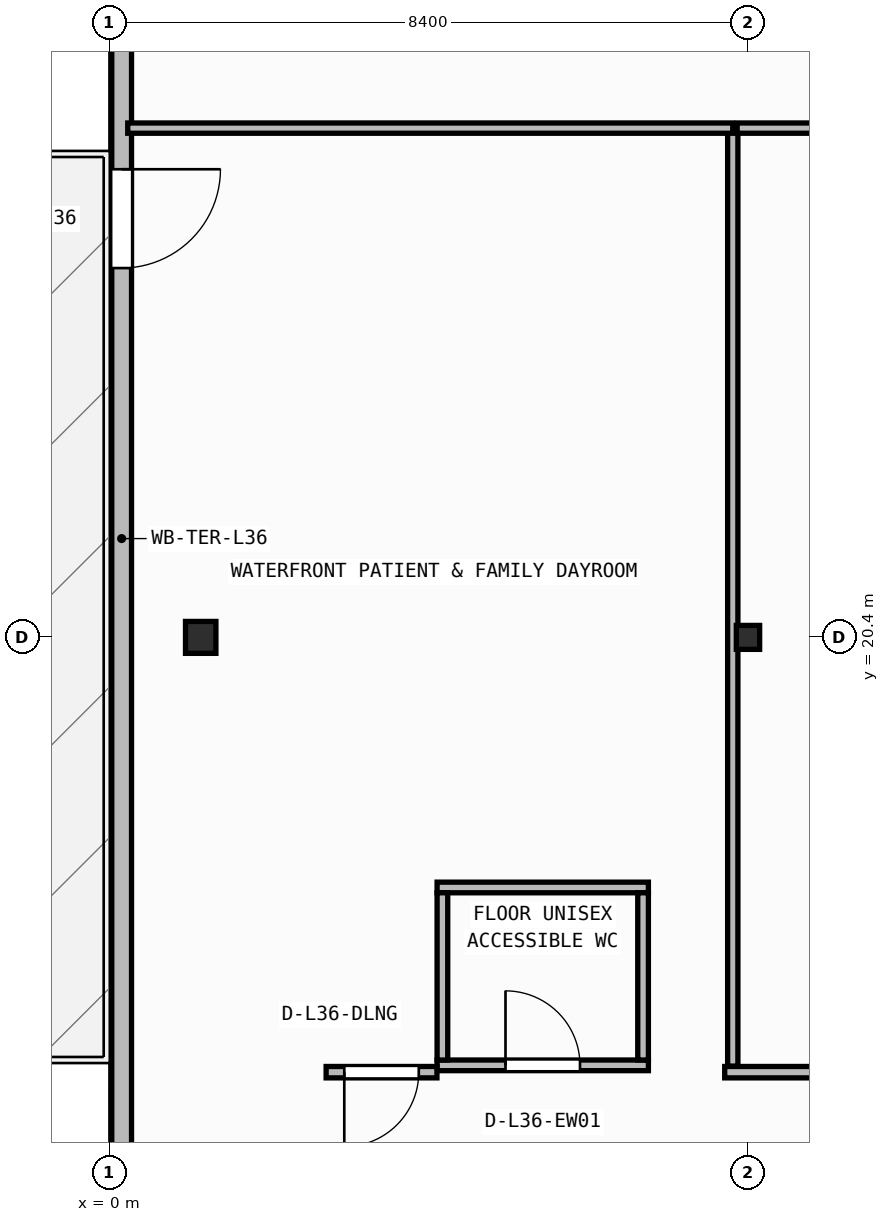
"""IFC4 building model, lengths in metres.
Left out: names, types, materials, properties, quantities, classifications, styles, units other than length and angle.
Written with IfcOpenShell. Run it as: python <this file> out.ifc"""

import sys

from ifc_helpers import new_model, si_unit, direction, frame, frame_2d, origin, origin_2d, place, context, subcontext, project, spatial, rectangle, i_section, extrude, element, fill, save


model = new_model("IFC4")
c1 = context("Model", 3, precision=1e-05, world=origin(), true_north=direction((0.0, 1.0)))
c2 = subcontext(c1, "Body", "Model", "MODEL_VIEW")
j1 = project(units=[si_unit("LENGTHUNIT", "METRE"), si_unit("PLANEANGLEUNIT", "RADIAN")], contexts=[c1])
p1 = place(None, origin())
s1 = spatial("IfcSite", under=j1, at=p1, CompositionType="ELEMENT")
p2 = place(p1, origin())
s2 = spatial("IfcBuilding", under=s1, at=p2, CompositionType="ELEMENT")
p3 = place(p2, frame((0.0, 0.0, 146.8)))
s3 = spatial("IfcBuildingStorey", under=s2, at=p3, CompositionType="ELEMENT", Elevation=146.8)
p4 = place(p3, frame((1.2, 20.4, 0.0), z_axis=(0.0, 0.0, 1.0), x_axis=(1.0, 0.0, 0.0)))
e1 = element("IfcColumn", 1, at=p4, inside=s3, PredefinedType="COLUMN", context=c2, shape_type="SweptSolid", body=[
    extrude(i_section(OverallWidth=0.4, OverallDepth=0.42, WebThickness=0.025, FlangeThickness=0.04, at=origin_2d()), origin(), (0.0, 0.0, 1.0), 3.95),
])
p5 = place(p3, frame((8.4, 20.4, 0.0), z_axis=(0.0, 0.0, 1.0), x_axis=(1.0, 0.0, 0.0)))
e2 = element("IfcColumn", 2, at=p5, inside=s3, PredefinedType="COLUMN", context=c2, shape_type="SweptSolid", body=[
    extrude(i_section(OverallWidth=0.307, OverallDepth=0.315, WebThickness=0.012, FlangeThickness=0.019, FilletRadius=0.017, at=origin_2d()), origin(), (0.0, 0.0, 1.0), 3.95),
])
p6 = place(p3, frame((0.16, 40.64, 0.0), z_axis=(0.0, 0.0, 1.0), x_axis=(0.0, -1.0, 0.0)))
e3 = element("IfcWall", 3, at=p6, inside=s3, PredefinedType="STANDARD", context=c2, shape_type="SweptSolid", body=[
    extrude(rectangle(XDim=37.88, YDim=0.26, at=frame_2d((18.94, 0.0))), origin(), (0.0, 0.0, 1.0), 3.71),
])
p7 = place(p6, frame((14.081, 0.0, 0.0)))
e4 = element("IfcOpeningElement", 4, at=p7, cuts=e3, PredefinedType="OPENING", context=c2, shape_type="SweptSolid", body=[
    extrude(rectangle(XDim=1.3, YDim=2.15, at=frame_2d((0.65, 1.075))), frame((0.0, 0.14, 0.0), z_axis=(0.0, -1.0, 0.0), x_axis=(1.0, 0.0, 0.0)), (0.0, 0.0, 1.0), 0.28),
])
p8 = place(p3, frame((4.31, 14.77, 0.0), z_axis=(0.0, 0.0, 1.0), x_axis=(1.0, 0.0, 0.0)))
e5 = element("IfcWall", 5, at=p8, inside=s3, PredefinedType="PARTITIONING", context=c2, shape_type="SweptSolid", body=[
    extrude(rectangle(XDim=2.78, YDim=0.14, at=frame_2d((1.39, 0.0))), origin(), (0.0, 0.0, 1.0), 3.71),
])
p9 = place(p8, frame((0.9, 0.0, 0.0)))
e6 = element("IfcOpeningElement", 6, at=p9, cuts=e5, PredefinedType="OPENING", context=c2, shape_type="SweptSolid", body=[
    extrude(rectangle(XDim=0.98, YDim=2.1, at=frame_2d((0.49, 1.05))), frame((0.0, 0.08, 0.0), z_axis=(0.0, -1.0, 0.0), x_axis=(1.0, 0.0, 0.0)), (0.0, 0.0, 1.0), 0.16),
])
p10 = place(p3, frame((4.31, 17.11, 0.0), z_axis=(0.0, 0.0, 1.0), x_axis=(1.0, 0.0, 0.0)))
e7 = element("IfcWall", 7, at=p10, inside=s3, PredefinedType="PARTITIONING", context=c2, shape_type="SweptSolid", body=[
    extrude(rectangle(XDim=2.78, YDim=0.14, at=frame_2d((1.39, 0.0))), origin(), (0.0, 0.0, 1.0), 3.71),
])
for number, where, z_axis, x_axis in (
    (8, (4.38, 14.84, 0.0), (0.0, 0.0, 1.0), (0.0, 1.0, 0.0)),
    (9, (7.02, 14.84, 0.0), (0.0, 0.0, 1.0), (0.0, 1.0, 0.0)),
):
    element("IfcWall", number, at=place(p3, frame(where, z_axis=z_axis, x_axis=x_axis)), inside=s3, PredefinedType="PARTITIONING", context=c2, shape_type="SweptSolid", body=[
        extrude(rectangle(XDim=2.2, YDim=0.14, at=frame_2d((1.1, 0.0))), origin(), (0.0, 0.0, 1.0), 3.71),
    ])
p11 = place(p3, frame((4.308, 14.68, 0.0), z_axis=(0.0, 0.0, 1.0), x_axis=(-1.0, 0.0, 0.0)))
e10 = element("IfcWall", 10, at=p11, inside=s3, PredefinedType="PARTITIONING", context=c2, shape_type="SweptSolid", body=[
    extrude(rectangle(XDim=1.458, YDim=0.15, at=frame_2d((0.729, 0.0))), origin(), (0.0, 0.0, 1.0), 3.71),
])
p12 = place(p11, frame((0.239, 0.0, 0.0)))
e11 = element("IfcOpeningElement", 11, at=p12, cuts=e10, PredefinedType="OPENING", context=c2, shape_type="SweptSolid", body=[
    extrude(rectangle(XDim=0.98, YDim=2.1, at=frame_2d((0.49, 1.05))), frame((0.0, 0.085, 0.0), z_axis=(0.0, -1.0, 0.0), x_axis=(1.0, 0.0, 0.0)), (0.0, 0.0, 1.0), 0.17),
])
p13 = place(p3, frame((19.346, 14.68, 0.0), z_axis=(0.0, 0.0, 1.0), x_axis=(-1.0, 0.0, 0.0)))
e12 = element("IfcWall", 12, at=p13, inside=s3, PredefinedType="PARTITIONING", context=c2, shape_type="SweptSolid", body=[
    extrude(rectangle(XDim=11.252, YDim=0.15, at=frame_2d((5.626, 0.0))), origin(), (0.0, 0.0, 1.0), 3.71),
])
p14 = place(p13, frame((5.076, 0.0, 0.0)))
e13 = element("IfcOpeningElement", 13, at=p14, cuts=e12, PredefinedType="OPENING", context=c2, shape_type="SweptSolid", body=[
    extrude(rectangle(XDim=1.1, YDim=2.1, at=frame_2d((0.55, 1.05))), frame((0.0, 0.085, 0.0), z_axis=(0.0, -1.0, 0.0), x_axis=(1.0, 0.0, 0.0)), (0.0, 0.0, 1.0), 0.17),
])
p15 = place(p3, frame((8.2, 14.76, 0.0), z_axis=(0.0, 0.0, 1.0), x_axis=(0.0, 1.0, 0.0)))
e14 = element("IfcWall", 14, at=p15, inside=s3, PredefinedType="PARTITIONING", context=c2, shape_type="SweptSolid", body=[
    extrude(rectangle(XDim=12.34, YDim=0.135, at=frame_2d((6.17, 0.0))), origin(), (0.0, 0.0, 1.0), 3.152),
])
p16 = place(p3, frame((8.2, 27.1, 0.0), z_axis=(0.0, 0.0, 1.0), x_axis=(-1.0, 0.0, 0.0)))
e15 = element("IfcWall", 15, at=p16, inside=s3, PredefinedType="PARTITIONING", context=c2, shape_type="SweptSolid", body=[
    extrude(rectangle(XDim=7.96, YDim=0.135, at=frame_2d((3.98, 0.0))), origin(), (0.0, 0.0, 1.0), 3.71),
])
p17 = place(p3, frame((19.12, 27.1, 0.0), z_axis=(0.0, 0.0, 1.0), x_axis=(-1.0, 0.0, 0.0)))
e16 = element("IfcWall", 16, at=p17, inside=s3, PredefinedType="PARTITIONING", context=c2, shape_type="SweptSolid", body=[
    extrude(rectangle(XDim=10.863, YDim=0.135, at=frame_2d((5.431, 0.0))), origin(), (0.0, 0.0, 1.0), 3.71),
])
p18 = place(p7, origin())
e17 = element("IfcDoor", 17, at=p18, inside=s3, OperationType="SINGLE_SWING_LEFT", PredefinedType="DOOR", context=c2, shape_type="SweptSolid", body=[
    extrude(rectangle(XDim=1.3, YDim=2.15, at=frame_2d((0.65, 1.075))), frame((0.0, 0.025, 0.0), z_axis=(0.0, -1.0, 0.0), x_axis=(1.0, 0.0, 0.0)), (0.0, 0.0, 1.0), 0.05),
])
fill(e4, e17)
p19 = place(p9, origin())
e18 = element("IfcDoor", 18, at=p19, inside=s3, OperationType="SINGLE_SWING_LEFT", PredefinedType="DOOR", context=c2, shape_type="SweptSolid", body=[
    extrude(rectangle(XDim=0.98, YDim=2.1, at=frame_2d((0.49, 1.05))), frame((0.0, 0.025, 0.0), z_axis=(0.0, -1.0, 0.0), x_axis=(1.0, 0.0, 0.0)), (0.0, 0.0, 1.0), 0.05),
])
fill(e6, e18)
p20 = place(p12, origin())
e19 = element("IfcDoor", 19, at=p20, inside=s3, OperationType="SINGLE_SWING_RIGHT", PredefinedType="DOOR", context=c2, shape_type="SweptSolid", body=[
    extrude(rectangle(XDim=0.98, YDim=2.1, at=frame_2d((0.49, 1.05))), frame((0.0, 0.025, 0.0), z_axis=(0.0, -1.0, 0.0), x_axis=(1.0, 0.0, 0.0)), (0.0, 0.0, 1.0), 0.05),
])
fill(e11, e19)
save(model, sys.argv[1])
